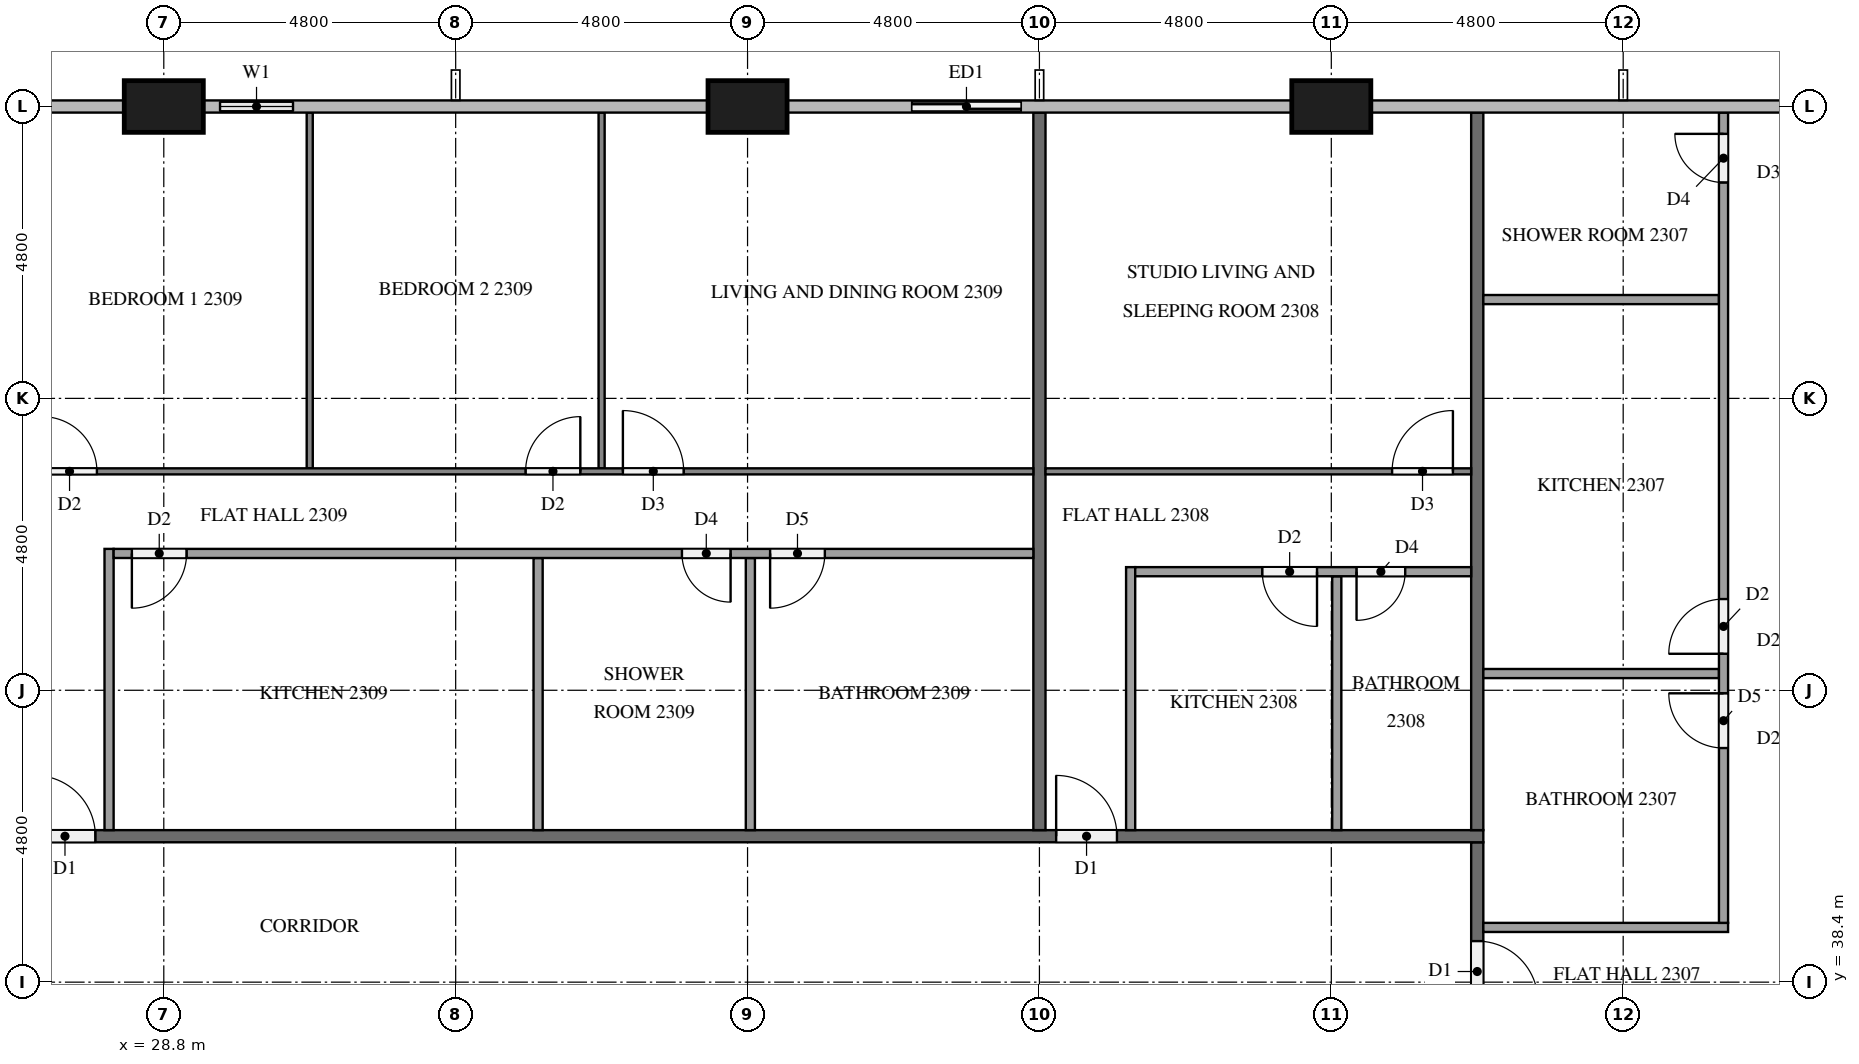
"""IFC4 building model, lengths in metres.
Left out: names, types, materials, properties, quantities, classifications, styles, units other than length and angle.
Written with IfcOpenShell. Run it as: python <this file> out.ifc"""

import sys

from ifc_helpers import new_model, si_unit, direction, frame, frame_2d, origin, origin_2d, place, context, subcontext, project, spatial, rectangle, extrude, element, fill, save


model = new_model("IFC4")
c1 = context("Model", 3, precision=1e-05, world=origin(), true_north=direction((0.0, 1.0)))
c2 = subcontext(c1, "Body", "Model", "MODEL_VIEW")
j1 = project(units=[si_unit("LENGTHUNIT", "METRE"), si_unit("PLANEANGLEUNIT", "RADIAN")], contexts=[c1])
p1 = place(None, origin())
s1 = spatial("IfcSite", under=j1, at=p1, CompositionType="ELEMENT")
p2 = place(p1, origin())
s2 = spatial("IfcBuilding", under=s1, at=p2, CompositionType="ELEMENT")
p3 = place(p2, frame((0.0, 0.0, 92.7)))
s3 = spatial("IfcBuildingStorey", under=s2, at=p3, CompositionType="ELEMENT", Elevation=92.7)
for number, where, z_axis, x_axis in (
    (1, (48.0, 52.8, 0.0), (0.0, 0.0, 1.0), (1.0, 0.0, 0.0)),
    (2, (38.4, 52.8, 0.0), (0.0, 0.0, 1.0), (1.0, 0.0, 0.0)),
    (3, (28.8, 52.8, 0.0), (0.0, 0.0, 1.0), (1.0, 0.0, 0.0)),
):
    element("IfcColumn", number, at=place(p3, frame(where, z_axis=z_axis, x_axis=x_axis)), inside=s3, PredefinedType="COLUMN", context=c2, shape_type="SweptSolid", body=[
        extrude(rectangle(XDim=1.3, YDim=0.85, at=origin_2d()), origin(), (0.0, 0.0, 1.0), 3.2),
    ])
p4 = place(p3, frame((43.2, 52.8, 0.0), z_axis=(0.0, 0.0, 1.0), x_axis=(-1.0, 0.0, 0.0)))
e4 = element("IfcWall", 4, at=p4, inside=s3, PredefinedType="SOLIDWALL", context=c2, shape_type="SweptSolid", body=[
    extrude(rectangle(XDim=2.4, YDim=0.15, at=frame_2d((1.2, 0.0))), origin(), (0.0, 0.0, 1.0), 3.2),
])
p5 = place(p4, frame((0.3, 0.0, 0.0)))
e5 = element("IfcOpeningElement", 5, at=p5, cuts=e4, PredefinedType="OPENING", context=c2, shape_type="SweptSolid", body=[
    extrude(rectangle(XDim=1.8, YDim=2.4, at=frame_2d((0.9, 1.2))), frame((0.0, 0.085, 0.0), z_axis=(0.0, -1.0, 0.0), x_axis=(1.0, 0.0, 0.0)), (0.0, 0.0, 1.0), 0.17),
])
p6 = place(p3, frame((31.2, 52.8, 0.0), z_axis=(0.0, 0.0, 1.0), x_axis=(-1.0, 0.0, 0.0)))
e6 = element("IfcWall", 6, at=p6, inside=s3, PredefinedType="SOLIDWALL", context=c2, shape_type="SweptSolid", body=[
    extrude(rectangle(XDim=1.75, YDim=0.15, at=frame_2d((0.875, 0.0))), origin(), (0.0, 0.0, 1.0), 3.2),
])
p7 = place(p6, frame((0.275, 0.0, 0.9)))
e7 = element("IfcOpeningElement", 7, at=p7, cuts=e6, PredefinedType="OPENING", context=c2, shape_type="SweptSolid", body=[
    extrude(rectangle(XDim=1.2, YDim=1.4, at=frame_2d((0.6, 0.7))), frame((0.0, 0.085, 0.0), z_axis=(0.0, -1.0, 0.0), x_axis=(1.0, 0.0, 0.0)), (0.0, 0.0, 1.0), 0.17),
])
p8 = place(p3, frame((50.4, 40.7, 0.0), z_axis=(0.0, 0.0, 1.0), x_axis=(0.0, -1.0, 0.0)))
e8 = element("IfcWall", 8, at=p8, inside=s3, PredefinedType="PARTITIONING", context=c2, shape_type="SweptSolid", body=[
    extrude(rectangle(XDim=2.8, YDim=0.2, at=frame_2d((1.4, 0.0))), origin(), (0.0, 0.0, 1.0), 3.2),
])
p9 = place(p8, frame((1.625, 0.0, 0.0)))
e9 = element("IfcOpeningElement", 9, at=p9, cuts=e8, PredefinedType="OPENING", context=c2, shape_type="SweptSolid", body=[
    extrude(rectangle(XDim=1.0, YDim=2.1, at=frame_2d((0.5, 1.05))), frame((0.0, 0.11, 0.0), z_axis=(0.0, -1.0, 0.0), x_axis=(1.0, 0.0, 0.0)), (0.0, 0.0, 1.0), 0.22),
])
p10 = place(p3, frame((11.9, 40.8, 0.0), z_axis=(0.0, 0.0, 1.0), x_axis=(1.0, 0.0, 0.0)))
e10 = element("IfcWall", 10, at=p10, inside=s3, PredefinedType="PARTITIONING", context=c2, shape_type="SweptSolid", body=[
    extrude(rectangle(XDim=38.6, YDim=0.2, at=frame_2d((19.3, 0.0))), origin(), (0.0, 0.0, 1.0), 3.2),
])
p11 = place(p10, frame((31.575, 0.0, 0.0)))
e11 = element("IfcOpeningElement", 11, at=p11, cuts=e10, PredefinedType="OPENING", context=c2, shape_type="SweptSolid", body=[
    extrude(rectangle(XDim=1.0, YDim=2.1, at=frame_2d((0.5, 1.05))), frame((0.0, 0.11, 0.0), z_axis=(0.0, -1.0, 0.0), x_axis=(1.0, 0.0, 0.0)), (0.0, 0.0, 1.0), 0.22),
])
p12 = place(p10, frame((14.775, 0.0, 0.0)))
e12 = element("IfcOpeningElement", 12, at=p12, cuts=e10, PredefinedType="OPENING", context=c2, shape_type="SweptSolid", body=[
    extrude(rectangle(XDim=1.0, YDim=2.1, at=frame_2d((0.5, 1.05))), frame((0.0, 0.11, 0.0), z_axis=(0.0, -1.0, 0.0), x_axis=(1.0, 0.0, 0.0)), (0.0, 0.0, 1.0), 0.22),
])
p13 = place(p10, frame((0.375, 0.0, 0.0)))
e13 = element("IfcOpeningElement", 13, at=p13, cuts=e10, PredefinedType="OPENING", context=c2, shape_type="SweptSolid", body=[
    extrude(rectangle(XDim=1.0, YDim=2.1, at=frame_2d((0.5, 1.05))), frame((0.0, 0.11, 0.0), z_axis=(0.0, -1.0, 0.0), x_axis=(1.0, 0.0, 0.0)), (0.0, 0.0, 1.0), 0.22),
])
for number, where, z_axis, x_axis in (
    (14, (50.4, 40.9, 0.0), (0.0, 0.0, 1.0), (0.0, 1.0, 0.0)),
    (15, (43.2, 52.7, 0.0), (0.0, 0.0, 1.0), (0.0, -1.0, 0.0)),
):
    element("IfcWall", number, at=place(p3, frame(where, z_axis=z_axis, x_axis=x_axis)), inside=s3, PredefinedType="PARTITIONING", context=c2, shape_type="SweptSolid", body=[
        extrude(rectangle(XDim=11.8, YDim=0.2, at=frame_2d((5.9, 0.0))), origin(), (0.0, 0.0, 1.0), 3.2),
    ])
for number, where, z_axis, x_axis in (
    (16, (50.5, 43.475, 0.0), (0.0, 0.0, 1.0), (1.0, 0.0, 0.0)),
    (17, (50.5, 49.625, 0.0), (0.0, 0.0, 1.0), (1.0, 0.0, 0.0)),
):
    element("IfcWall", number, at=place(p3, frame(where, z_axis=z_axis, x_axis=x_axis)), inside=s3, PredefinedType="PARTITIONING", context=c2, shape_type="SweptSolid", body=[
        extrude(rectangle(XDim=3.875, YDim=0.15, at=frame_2d((1.938, 0.0))), origin(), (0.0, 0.0, 1.0), 3.2),
    ])
p14 = place(p3, frame((50.5, 39.3, 0.0), z_axis=(0.0, 0.0, 1.0), x_axis=(1.0, 0.0, 0.0)))
e18 = element("IfcWall", 18, at=p14, inside=s3, PredefinedType="PARTITIONING", context=c2, shape_type="SweptSolid", body=[
    extrude(rectangle(XDim=4.025, YDim=0.15, at=frame_2d((2.012, 0.0))), origin(), (0.0, 0.0, 1.0), 3.2),
])
p15 = place(p3, frame((54.45, 39.375, 0.0), z_axis=(0.0, 0.0, 1.0), x_axis=(0.0, 1.0, 0.0)))
e19 = element("IfcWall", 19, at=p15, inside=s3, PredefinedType="PARTITIONING", context=c2, shape_type="SweptSolid", body=[
    extrude(rectangle(XDim=13.325, YDim=0.15, at=frame_2d((6.663, 0.0))), origin(), (0.0, 0.0, 1.0), 3.2),
])
p16 = place(p15, frame((2.875, 0.0, 0.0)))
e20 = element("IfcOpeningElement", 20, at=p16, cuts=e19, PredefinedType="OPENING", context=c2, shape_type="SweptSolid", body=[
    extrude(rectangle(XDim=0.9, YDim=2.1, at=frame_2d((0.45, 1.05))), frame((0.0, 0.085, 0.0), z_axis=(0.0, -1.0, 0.0), x_axis=(1.0, 0.0, 0.0)), (0.0, 0.0, 1.0), 0.17),
])
p17 = place(p15, frame((4.425, 0.0, 0.0)))
e21 = element("IfcOpeningElement", 21, at=p17, cuts=e19, PredefinedType="OPENING", context=c2, shape_type="SweptSolid", body=[
    extrude(rectangle(XDim=0.9, YDim=2.1, at=frame_2d((0.45, 1.05))), frame((0.0, 0.085, 0.0), z_axis=(0.0, -1.0, 0.0), x_axis=(1.0, 0.0, 0.0)), (0.0, 0.0, 1.0), 0.17),
])
p18 = place(p15, frame((12.175, 0.0, 0.0)))
e22 = element("IfcOpeningElement", 22, at=p18, cuts=e19, PredefinedType="OPENING", context=c2, shape_type="SweptSolid", body=[
    extrude(rectangle(XDim=0.8, YDim=2.1, at=frame_2d((0.4, 1.05))), frame((0.0, 0.085, 0.0), z_axis=(0.0, -1.0, 0.0), x_axis=(1.0, 0.0, 0.0)), (0.0, 0.0, 1.0), 0.17),
])
p19 = place(p3, frame((43.3, 46.8, 0.0), z_axis=(0.0, 0.0, 1.0), x_axis=(1.0, 0.0, 0.0)))
e23 = element("IfcWall", 23, at=p19, inside=s3, PredefinedType="PARTITIONING", context=c2, shape_type="SweptSolid", body=[
    extrude(rectangle(XDim=7.0, YDim=0.1, at=frame_2d((3.5, 0.0))), origin(), (0.0, 0.0, 1.0), 3.2),
])
p20 = place(p19, frame((5.7, 0.0, 0.0)))
e24 = element("IfcOpeningElement", 24, at=p20, cuts=e23, PredefinedType="OPENING", context=c2, shape_type="SweptSolid", body=[
    extrude(rectangle(XDim=1.0, YDim=2.1, at=frame_2d((0.5, 1.05))), frame((0.0, 0.06, 0.0), z_axis=(0.0, -1.0, 0.0), x_axis=(1.0, 0.0, 0.0)), (0.0, 0.0, 1.0), 0.12),
])
p21 = place(p3, frame((48.09, 40.9, 0.0), z_axis=(0.0, 0.0, 1.0), x_axis=(0.0, 1.0, 0.0)))
e25 = element("IfcWall", 25, at=p21, inside=s3, PredefinedType="PARTITIONING", context=c2, shape_type="SweptSolid", body=[
    extrude(rectangle(XDim=4.175, YDim=0.15, at=frame_2d((2.087, 0.0))), origin(), (0.0, 0.0, 1.0), 3.2),
])
p22 = place(p3, frame((44.7, 40.9, 0.0), z_axis=(0.0, 0.0, 1.0), x_axis=(0.0, 1.0, 0.0)))
e26 = element("IfcWall", 26, at=p22, inside=s3, PredefinedType="PARTITIONING", context=c2, shape_type="SweptSolid", body=[
    extrude(rectangle(XDim=4.325, YDim=0.15, at=frame_2d((2.163, 0.0))), origin(), (0.0, 0.0, 1.0), 3.2),
])
p23 = place(p3, frame((50.3, 45.15, 0.0), z_axis=(0.0, 0.0, 1.0), x_axis=(-1.0, 0.0, 0.0)))
e27 = element("IfcWall", 27, at=p23, inside=s3, PredefinedType="PARTITIONING", context=c2, shape_type="SweptSolid", body=[
    extrude(rectangle(XDim=5.525, YDim=0.15, at=frame_2d((2.763, 0.0))), origin(), (0.0, 0.0, 1.0), 3.2),
])
p24 = place(p23, frame((2.535, 0.0, 0.0)))
e28 = element("IfcOpeningElement", 28, at=p24, cuts=e27, PredefinedType="OPENING", context=c2, shape_type="SweptSolid", body=[
    extrude(rectangle(XDim=0.9, YDim=2.1, at=frame_2d((0.45, 1.05))), frame((0.0, 0.085, 0.0), z_axis=(0.0, -1.0, 0.0), x_axis=(1.0, 0.0, 0.0)), (0.0, 0.0, 1.0), 0.17),
])
p25 = place(p23, frame((1.085, 0.0, 0.0)))
e29 = element("IfcOpeningElement", 29, at=p25, cuts=e27, PredefinedType="OPENING", context=c2, shape_type="SweptSolid", body=[
    extrude(rectangle(XDim=0.8, YDim=2.1, at=frame_2d((0.4, 1.05))), frame((0.0, 0.085, 0.0), z_axis=(0.0, -1.0, 0.0), x_axis=(1.0, 0.0, 0.0)), (0.0, 0.0, 1.0), 0.17),
])
for number, where, z_axis, x_axis in (
    (30, (31.2, 46.85, 0.0), (0.0, 0.0, 1.0), (0.0, 1.0, 0.0)),
    (31, (36.0, 46.85, 0.0), (0.0, 0.0, 1.0), (0.0, 1.0, 0.0)),
):
    element("IfcWall", number, at=place(p3, frame(where, z_axis=z_axis, x_axis=x_axis)), inside=s3, PredefinedType="PARTITIONING", context=c2, shape_type="SweptSolid", body=[
        extrude(rectangle(XDim=5.85, YDim=0.1, at=frame_2d((2.925, 0.0))), origin(), (0.0, 0.0, 1.0), 3.2),
    ])
p26 = place(p3, frame((26.5, 46.8, 0.0), z_axis=(0.0, 0.0, 1.0), x_axis=(1.0, 0.0, 0.0)))
e32 = element("IfcWall", 32, at=p26, inside=s3, PredefinedType="PARTITIONING", context=c2, shape_type="SweptSolid", body=[
    extrude(rectangle(XDim=16.6, YDim=0.1, at=frame_2d((8.3, 0.0))), origin(), (0.0, 0.0, 1.0), 3.2),
])
p27 = place(p26, frame((0.3, 0.0, 0.0)))
e33 = element("IfcOpeningElement", 33, at=p27, cuts=e32, PredefinedType="OPENING", context=c2, shape_type="SweptSolid", body=[
    extrude(rectangle(XDim=0.9, YDim=2.1, at=frame_2d((0.45, 1.05))), frame((0.0, 0.06, 0.0), z_axis=(0.0, -1.0, 0.0), x_axis=(1.0, 0.0, 0.0)), (0.0, 0.0, 1.0), 0.12),
])
p28 = place(p26, frame((8.25, 0.0, 0.0)))
e34 = element("IfcOpeningElement", 34, at=p28, cuts=e32, PredefinedType="OPENING", context=c2, shape_type="SweptSolid", body=[
    extrude(rectangle(XDim=0.9, YDim=2.1, at=frame_2d((0.45, 1.05))), frame((0.0, 0.06, 0.0), z_axis=(0.0, -1.0, 0.0), x_axis=(1.0, 0.0, 0.0)), (0.0, 0.0, 1.0), 0.12),
])
p29 = place(p26, frame((9.85, 0.0, 0.0)))
e35 = element("IfcOpeningElement", 35, at=p29, cuts=e32, PredefinedType="OPENING", context=c2, shape_type="SweptSolid", body=[
    extrude(rectangle(XDim=1.0, YDim=2.1, at=frame_2d((0.5, 1.05))), frame((0.0, 0.06, 0.0), z_axis=(0.0, -1.0, 0.0), x_axis=(1.0, 0.0, 0.0)), (0.0, 0.0, 1.0), 0.12),
])
for number, where, z_axis, x_axis in (
    (36, (34.956, 40.9, 0.0), (0.0, 0.0, 1.0), (0.0, 1.0, 0.0)),
    (37, (38.446, 40.9, 0.0), (0.0, 0.0, 1.0), (0.0, 1.0, 0.0)),
):
    element("IfcWall", number, at=place(p3, frame(where, z_axis=z_axis, x_axis=x_axis)), inside=s3, PredefinedType="PARTITIONING", context=c2, shape_type="SweptSolid", body=[
        extrude(rectangle(XDim=4.475, YDim=0.15, at=frame_2d((2.238, 0.0))), origin(), (0.0, 0.0, 1.0), 3.2),
    ])
p30 = place(p3, frame((27.9, 40.9, 0.0), z_axis=(0.0, 0.0, 1.0), x_axis=(0.0, 1.0, 0.0)))
e38 = element("IfcWall", 38, at=p30, inside=s3, PredefinedType="PARTITIONING", context=c2, shape_type="SweptSolid", body=[
    extrude(rectangle(XDim=4.625, YDim=0.15, at=frame_2d((2.312, 0.0))), origin(), (0.0, 0.0, 1.0), 3.2),
])
p31 = place(p3, frame((43.1, 45.45, 0.0), z_axis=(0.0, 0.0, 1.0), x_axis=(-1.0, 0.0, 0.0)))
e39 = element("IfcWall", 39, at=p31, inside=s3, PredefinedType="PARTITIONING", context=c2, shape_type="SweptSolid", body=[
    extrude(rectangle(XDim=15.125, YDim=0.15, at=frame_2d((7.562, 0.0))), origin(), (0.0, 0.0, 1.0), 3.2),
])
p32 = place(p31, frame((13.925, 0.0, 0.0)))
e40 = element("IfcOpeningElement", 40, at=p32, cuts=e39, PredefinedType="OPENING", context=c2, shape_type="SweptSolid", body=[
    extrude(rectangle(XDim=0.9, YDim=2.1, at=frame_2d((0.45, 1.05))), frame((0.0, 0.085, 0.0), z_axis=(0.0, -1.0, 0.0), x_axis=(1.0, 0.0, 0.0)), (0.0, 0.0, 1.0), 0.17),
])
p33 = place(p31, frame((4.979, 0.0, 0.0)))
e41 = element("IfcOpeningElement", 41, at=p33, cuts=e39, PredefinedType="OPENING", context=c2, shape_type="SweptSolid", body=[
    extrude(rectangle(XDim=0.8, YDim=2.1, at=frame_2d((0.4, 1.05))), frame((0.0, 0.085, 0.0), z_axis=(0.0, -1.0, 0.0), x_axis=(1.0, 0.0, 0.0)), (0.0, 0.0, 1.0), 0.17),
])
p34 = place(p31, frame((3.429, 0.0, 0.0)))
e42 = element("IfcOpeningElement", 42, at=p34, cuts=e39, PredefinedType="OPENING", context=c2, shape_type="SweptSolid", body=[
    extrude(rectangle(XDim=0.9, YDim=2.1, at=frame_2d((0.45, 1.05))), frame((0.0, 0.085, 0.0), z_axis=(0.0, -1.0, 0.0), x_axis=(1.0, 0.0, 0.0)), (0.0, 0.0, 1.0), 0.17),
])
p35 = place(p5, origin())
e43 = element("IfcDoor", 43, at=p35, inside=s3, OperationType="SLIDING_TO_RIGHT", PredefinedType="DOOR", context=c2, shape_type="SweptSolid", body=[
    extrude(rectangle(XDim=1.8, YDim=2.4, at=frame_2d((0.9, 1.2))), frame((0.0, 0.025, 0.0), z_axis=(0.0, -1.0, 0.0), x_axis=(1.0, 0.0, 0.0)), (0.0, 0.0, 1.0), 0.05),
])
fill(e5, e43)
p36 = place(p7, origin())
e44 = element("IfcWindow", 44, at=p36, inside=s3, PartitioningType="SINGLE_PANEL", PredefinedType="WINDOW", context=c2, shape_type="SweptSolid", body=[
    extrude(rectangle(XDim=1.2, YDim=1.4, at=frame_2d((0.6, 0.7))), frame((0.0, 0.03, 0.0), z_axis=(0.0, -1.0, 0.0), x_axis=(1.0, 0.0, 0.0)), (0.0, 0.0, 1.0), 0.06),
])
fill(e7, e44)
p37 = place(p9, origin())
e45 = element("IfcDoor", 45, at=p37, inside=s3, OperationType="SINGLE_SWING_RIGHT", PredefinedType="DOOR", context=c2, shape_type="SweptSolid", body=[
    extrude(rectangle(XDim=1.0, YDim=2.1, at=frame_2d((0.5, 1.05))), frame((0.0, 0.025, 0.0), z_axis=(0.0, -1.0, 0.0), x_axis=(1.0, 0.0, 0.0)), (0.0, 0.0, 1.0), 0.05),
])
fill(e9, e45)
p38 = place(p11, origin())
e46 = element("IfcDoor", 46, at=p38, inside=s3, OperationType="SINGLE_SWING_LEFT", PredefinedType="DOOR", context=c2, shape_type="SweptSolid", body=[
    extrude(rectangle(XDim=1.0, YDim=2.1, at=frame_2d((0.5, 1.05))), frame((0.0, 0.025, 0.0), z_axis=(0.0, -1.0, 0.0), x_axis=(1.0, 0.0, 0.0)), (0.0, 0.0, 1.0), 0.05),
])
fill(e11, e46)
p39 = place(p12, origin())
e47 = element("IfcDoor", 47, at=p39, inside=s3, OperationType="SINGLE_SWING_LEFT", PredefinedType="DOOR", context=c2, shape_type="SweptSolid", body=[
    extrude(rectangle(XDim=1.0, YDim=2.1, at=frame_2d((0.5, 1.05))), frame((0.0, 0.025, 0.0), z_axis=(0.0, -1.0, 0.0), x_axis=(1.0, 0.0, 0.0)), (0.0, 0.0, 1.0), 0.05),
])
fill(e12, e47)
p40 = place(p16, origin())
e48 = element("IfcDoor", 48, at=p40, inside=s3, OperationType="SINGLE_SWING_RIGHT", PredefinedType="DOOR", context=c2, shape_type="SweptSolid", body=[
    extrude(rectangle(XDim=0.9, YDim=2.1, at=frame_2d((0.45, 1.05))), frame((0.0, 0.025, 0.0), z_axis=(0.0, -1.0, 0.0), x_axis=(1.0, 0.0, 0.0)), (0.0, 0.0, 1.0), 0.05),
])
fill(e20, e48)
p41 = place(p17, origin())
e49 = element("IfcDoor", 49, at=p41, inside=s3, OperationType="SINGLE_SWING_LEFT", PredefinedType="DOOR", context=c2, shape_type="SweptSolid", body=[
    extrude(rectangle(XDim=0.9, YDim=2.1, at=frame_2d((0.45, 1.05))), frame((0.0, 0.025, 0.0), z_axis=(0.0, -1.0, 0.0), x_axis=(1.0, 0.0, 0.0)), (0.0, 0.0, 1.0), 0.05),
])
fill(e21, e49)
p42 = place(p18, origin())
e50 = element("IfcDoor", 50, at=p42, inside=s3, OperationType="SINGLE_SWING_RIGHT", PredefinedType="DOOR", context=c2, shape_type="SweptSolid", body=[
    extrude(rectangle(XDim=0.8, YDim=2.1, at=frame_2d((0.4, 1.05))), frame((0.0, 0.025, 0.0), z_axis=(0.0, -1.0, 0.0), x_axis=(1.0, 0.0, 0.0)), (0.0, 0.0, 1.0), 0.05),
])
fill(e22, e50)
p43 = place(p20, origin())
e51 = element("IfcDoor", 51, at=p43, inside=s3, OperationType="SINGLE_SWING_RIGHT", PredefinedType="DOOR", context=c2, shape_type="SweptSolid", body=[
    extrude(rectangle(XDim=1.0, YDim=2.1, at=frame_2d((0.5, 1.05))), frame((0.0, 0.025, 0.0), z_axis=(0.0, -1.0, 0.0), x_axis=(1.0, 0.0, 0.0)), (0.0, 0.0, 1.0), 0.05),
])
fill(e24, e51)
p44 = place(p24, origin())
e52 = element("IfcDoor", 52, at=p44, inside=s3, OperationType="SINGLE_SWING_LEFT", PredefinedType="DOOR", context=c2, shape_type="SweptSolid", body=[
    extrude(rectangle(XDim=0.9, YDim=2.1, at=frame_2d((0.45, 1.05))), frame((0.0, 0.025, 0.0), z_axis=(0.0, -1.0, 0.0), x_axis=(1.0, 0.0, 0.0)), (0.0, 0.0, 1.0), 0.05),
])
fill(e28, e52)
p45 = place(p25, origin())
e53 = element("IfcDoor", 53, at=p45, inside=s3, OperationType="SINGLE_SWING_RIGHT", PredefinedType="DOOR", context=c2, shape_type="SweptSolid", body=[
    extrude(rectangle(XDim=0.8, YDim=2.1, at=frame_2d((0.4, 1.05))), frame((0.0, 0.025, 0.0), z_axis=(0.0, -1.0, 0.0), x_axis=(1.0, 0.0, 0.0)), (0.0, 0.0, 1.0), 0.05),
])
fill(e29, e53)
p46 = place(p27, origin())
e54 = element("IfcDoor", 54, at=p46, inside=s3, OperationType="SINGLE_SWING_LEFT", PredefinedType="DOOR", context=c2, shape_type="SweptSolid", body=[
    extrude(rectangle(XDim=0.9, YDim=2.1, at=frame_2d((0.45, 1.05))), frame((0.0, 0.025, 0.0), z_axis=(0.0, -1.0, 0.0), x_axis=(1.0, 0.0, 0.0)), (0.0, 0.0, 1.0), 0.05),
])
fill(e33, e54)
p47 = place(p28, origin())
e55 = element("IfcDoor", 55, at=p47, inside=s3, OperationType="SINGLE_SWING_RIGHT", PredefinedType="DOOR", context=c2, shape_type="SweptSolid", body=[
    extrude(rectangle(XDim=0.9, YDim=2.1, at=frame_2d((0.45, 1.05))), frame((0.0, 0.025, 0.0), z_axis=(0.0, -1.0, 0.0), x_axis=(1.0, 0.0, 0.0)), (0.0, 0.0, 1.0), 0.05),
])
fill(e34, e55)
p48 = place(p29, origin())
e56 = element("IfcDoor", 56, at=p48, inside=s3, OperationType="SINGLE_SWING_LEFT", PredefinedType="DOOR", context=c2, shape_type="SweptSolid", body=[
    extrude(rectangle(XDim=1.0, YDim=2.1, at=frame_2d((0.5, 1.05))), frame((0.0, 0.025, 0.0), z_axis=(0.0, -1.0, 0.0), x_axis=(1.0, 0.0, 0.0)), (0.0, 0.0, 1.0), 0.05),
])
fill(e35, e56)
p49 = place(p32, origin())
e57 = element("IfcDoor", 57, at=p49, inside=s3, OperationType="SINGLE_SWING_RIGHT", PredefinedType="DOOR", context=c2, shape_type="SweptSolid", body=[
    extrude(rectangle(XDim=0.9, YDim=2.1, at=frame_2d((0.45, 1.05))), frame((0.0, 0.025, 0.0), z_axis=(0.0, -1.0, 0.0), x_axis=(1.0, 0.0, 0.0)), (0.0, 0.0, 1.0), 0.05),
])
fill(e40, e57)
p50 = place(p33, origin())
e58 = element("IfcDoor", 58, at=p50, inside=s3, OperationType="SINGLE_SWING_LEFT", PredefinedType="DOOR", context=c2, shape_type="SweptSolid", body=[
    extrude(rectangle(XDim=0.8, YDim=2.1, at=frame_2d((0.4, 1.05))), frame((0.0, 0.025, 0.0), z_axis=(0.0, -1.0, 0.0), x_axis=(1.0, 0.0, 0.0)), (0.0, 0.0, 1.0), 0.05),
])
fill(e41, e58)
p51 = place(p34, origin())
e59 = element("IfcDoor", 59, at=p51, inside=s3, OperationType="SINGLE_SWING_RIGHT", PredefinedType="DOOR", context=c2, shape_type="SweptSolid", body=[
    extrude(rectangle(XDim=0.9, YDim=2.1, at=frame_2d((0.45, 1.05))), frame((0.0, 0.025, 0.0), z_axis=(0.0, -1.0, 0.0), x_axis=(1.0, 0.0, 0.0)), (0.0, 0.0, 1.0), 0.05),
])
fill(e42, e59)
save(model, sys.argv[1])
